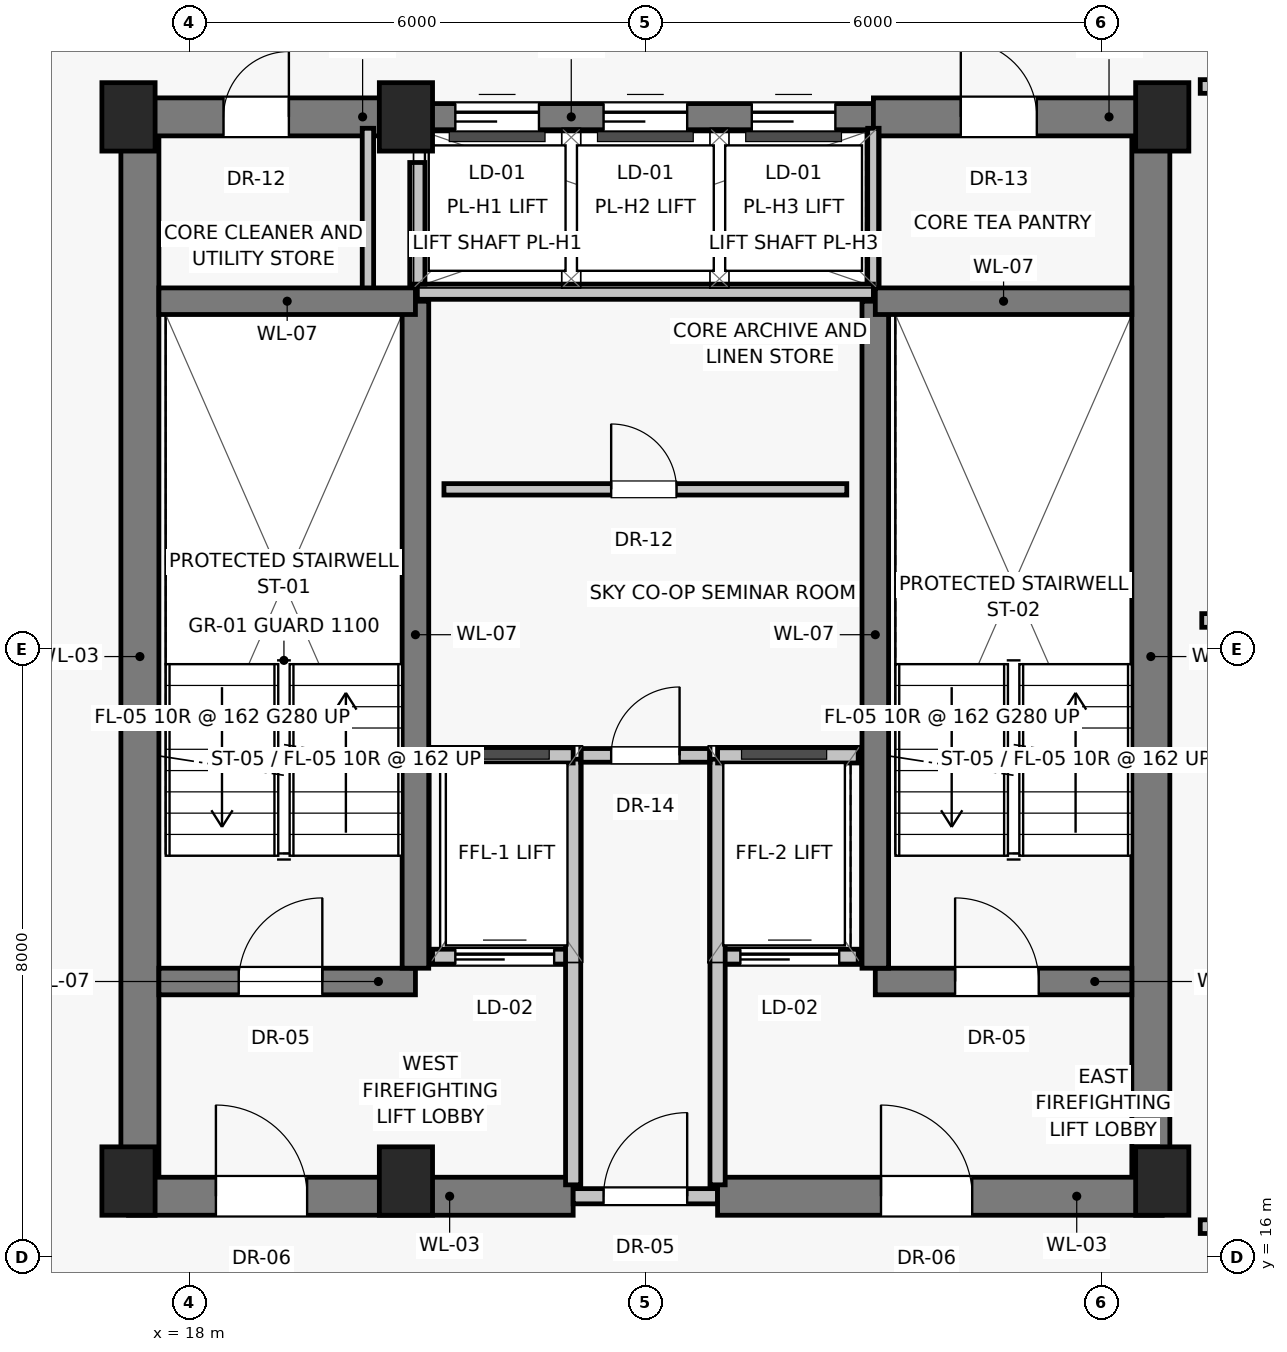
"""IFC4 building model, lengths in metres.
Left out: names, types, materials, properties, quantities, classifications, styles, units other than length and angle.
Written with IfcOpenShell. Run it as: python <this file> out.ifc"""

import sys

from ifc_helpers import new_model, si_unit, direction, frame, frame_2d, origin, origin_2d, place, context, subcontext, project, spatial, rectangle, extrude, source, transform, mapped, element, fill, save


model = new_model("IFC4")
c1 = context("Model", 3, precision=1e-05, world=origin(), true_north=direction((0.0, 1.0)))
c2 = subcontext(c1, "Body", "Model", "MODEL_VIEW")
j1 = project(units=[si_unit("LENGTHUNIT", "METRE"), si_unit("PLANEANGLEUNIT", "RADIAN")], contexts=[c1])
p1 = place(None, origin())
s1 = spatial("IfcSite", under=j1, at=p1, CompositionType="ELEMENT")
p2 = place(p1, origin())
s2 = spatial("IfcBuilding", under=s1, at=p2, CompositionType="ELEMENT")
p3 = place(p2, frame((0.0, 0.0, 261.0)))
s3 = spatial("IfcBuildingStorey", under=s2, at=p3, CompositionType="ELEMENT", Elevation=261.0)
for number, where, z_axis, x_axis in (
    (1, (17.2, 17.0, 0.0), (0.0, 0.0, 1.0), (1.0, 0.0, 0.0)),
    (2, (20.85, 17.0, 0.0), (0.0, 0.0, 1.0), (1.0, 0.0, 0.0)),
    (3, (30.8, 17.0, 0.0), (0.0, 0.0, 1.0), (1.0, 0.0, 0.0)),
    (4, (17.2, 31.0, 0.0), (0.0, 0.0, 1.0), (1.0, 0.0, 0.0)),
    (5, (20.85, 31.0, 0.0), (0.0, 0.0, 1.0), (1.0, 0.0, 0.0)),
    (6, (30.8, 31.0, 0.0), (0.0, 0.0, 1.0), (1.0, 0.0, 0.0)),
):
    element("IfcColumn", number, at=place(p3, frame(where, z_axis=z_axis, x_axis=x_axis)), inside=s3, PredefinedType="PILASTER", context=c2, shape_type="SweptSolid", body=[
        extrude(rectangle(XDim=0.7, YDim=0.9, at=origin_2d()), origin(), (0.0, 0.0, 1.0), 3.25),
    ])
for number, where, z_axis, x_axis in (
    (7, (17.35, 16.8, 0.0), (0.0, 0.0, 1.0), (0.0, 1.0, 0.0)),
    (8, (30.65, 16.8, 0.0), (0.0, 0.0, 1.0), (0.0, 1.0, 0.0)),
):
    element("IfcWall", number, at=place(p3, frame(where, z_axis=z_axis, x_axis=x_axis)), inside=s3, PredefinedType="SHEAR", context=c2, shape_type="SweptSolid", body=[
        extrude(rectangle(XDim=14.2, YDim=0.5, at=frame_2d((7.1, 0.0))), origin(), (0.0, 0.0, 1.0), 2.93),
    ])
p4 = place(p3, frame((17.2, 16.8, 0.0), z_axis=(0.0, 0.0, 1.0), x_axis=(1.0, 0.0, 0.0)))
e9 = element("IfcWall", 9, at=p4, inside=s3, PredefinedType="SHEAR", context=c2, shape_type="SweptSolid", body=[
    extrude(rectangle(XDim=5.85, YDim=0.5, at=frame_2d((2.925, 0.0))), origin(), (0.0, 0.0, 1.0), 2.93),
])
p5 = place(p4, frame((1.15, 0.0, 0.0)))
e10 = element("IfcOpeningElement", 10, at=p5, cuts=e9, PredefinedType="OPENING", context=c2, shape_type="SweptSolid", body=[
    extrude(rectangle(XDim=1.2, YDim=2.03, at=frame_2d((0.6, 1.015))), frame((0.0, 0.26, 0.0), z_axis=(0.0, -1.0, 0.0), x_axis=(1.0, 0.0, 0.0)), (0.0, 0.0, 1.0), 0.52),
])
p6 = place(p3, frame((23.05, 16.8, 0.0), z_axis=(0.0, 0.0, 1.0), x_axis=(1.0, 0.0, 0.0)))
e11 = element("IfcWall", 11, at=p6, inside=s3, PredefinedType="SOLIDWALL", context=c2, shape_type="SweptSolid", body=[
    extrude(rectangle(XDim=1.9, YDim=0.2, at=frame_2d((0.95, 0.0))), origin(), (0.0, 0.0, 1.0), 2.08),
])
p7 = place(p6, frame((0.4, 0.0, 0.0)))
e12 = element("IfcOpeningElement", 12, at=p7, cuts=e11, PredefinedType="OPENING", context=c2, shape_type="SweptSolid", body=[
    extrude(rectangle(XDim=1.1, YDim=2.03, at=frame_2d((0.55, 1.015))), frame((0.0, 0.11, 0.0), z_axis=(0.0, -1.0, 0.0), x_axis=(1.0, 0.0, 0.0)), (0.0, 0.0, 1.0), 0.22),
])
p8 = place(p3, frame((24.95, 16.8, 0.0), z_axis=(0.0, 0.0, 1.0), x_axis=(1.0, 0.0, 0.0)))
e13 = element("IfcWall", 13, at=p8, inside=s3, PredefinedType="SHEAR", context=c2, shape_type="SweptSolid", body=[
    extrude(rectangle(XDim=5.85, YDim=0.5, at=frame_2d((2.925, 0.0))), origin(), (0.0, 0.0, 1.0), 2.93),
])
p9 = place(p8, frame((2.15, 0.0, 0.0)))
e14 = element("IfcOpeningElement", 14, at=p9, cuts=e13, PredefinedType="OPENING", context=c2, shape_type="SweptSolid", body=[
    extrude(rectangle(XDim=1.2, YDim=2.03, at=frame_2d((0.6, 1.015))), frame((0.0, 0.26, 0.0), z_axis=(0.0, -1.0, 0.0), x_axis=(1.0, 0.0, 0.0)), (0.0, 0.0, 1.0), 0.52),
])
p10 = place(p3, frame((17.2, 31.0, 0.0), z_axis=(0.0, 0.0, 1.0), x_axis=(1.0, 0.0, 0.0)))
e15 = element("IfcWall", 15, at=p10, inside=s3, PredefinedType="SHEAR", context=c2, shape_type="SweptSolid", body=[
    extrude(rectangle(XDim=3.8, YDim=0.5, at=frame_2d((1.9, 0.0))), origin(), (0.0, 0.0, 1.0), 2.93),
])
p11 = place(p10, frame((1.25, 0.0, 0.0)))
e16 = element("IfcOpeningElement", 16, at=p11, cuts=e15, PredefinedType="OPENING", context=c2, shape_type="SweptSolid", body=[
    extrude(rectangle(XDim=0.86, YDim=2.01, at=frame_2d((0.43, 1.005))), frame((0.0, 0.26, 0.0), z_axis=(0.0, -1.0, 0.0), x_axis=(1.0, 0.0, 0.0)), (0.0, 0.0, 1.0), 0.52),
])
p12 = place(p3, frame((21.0, 31.0, 0.0), z_axis=(0.0, 0.0, 1.0), x_axis=(1.0, 0.0, 0.0)))
e17 = element("IfcWall", 17, at=p12, inside=s3, PredefinedType="SHEAR", context=c2, shape_type="SweptSolid", body=[
    extrude(rectangle(XDim=6.0, YDim=0.35, at=frame_2d((3.0, 0.0))), origin(), (0.0, 0.0, 1.0), 2.93),
])
p13 = place(p12, frame((0.5, 0.0, 0.0)))
e18 = element("IfcOpeningElement", 18, at=p13, cuts=e17, PredefinedType="OPENING", context=c2, shape_type="SweptSolid", body=[
    extrude(rectangle(XDim=1.1, YDim=2.08, at=frame_2d((0.55, 1.04))), frame((0.0, 0.185, 0.0), z_axis=(0.0, -1.0, 0.0), x_axis=(1.0, 0.0, 0.0)), (0.0, 0.0, 1.0), 0.37),
])
p14 = place(p12, frame((2.45, 0.0, 0.0)))
e19 = element("IfcOpeningElement", 19, at=p14, cuts=e17, PredefinedType="OPENING", context=c2, shape_type="SweptSolid", body=[
    extrude(rectangle(XDim=1.1, YDim=2.08, at=frame_2d((0.55, 1.04))), frame((0.0, 0.185, 0.0), z_axis=(0.0, -1.0, 0.0), x_axis=(1.0, 0.0, 0.0)), (0.0, 0.0, 1.0), 0.37),
])
p15 = place(p12, frame((4.4, 0.0, 0.0)))
e20 = element("IfcOpeningElement", 20, at=p15, cuts=e17, PredefinedType="OPENING", context=c2, shape_type="SweptSolid", body=[
    extrude(rectangle(XDim=1.1, YDim=2.08, at=frame_2d((0.55, 1.04))), frame((0.0, 0.185, 0.0), z_axis=(0.0, -1.0, 0.0), x_axis=(1.0, 0.0, 0.0)), (0.0, 0.0, 1.0), 0.37),
])
p16 = place(p3, frame((27.0, 31.0, 0.0), z_axis=(0.0, 0.0, 1.0), x_axis=(1.0, 0.0, 0.0)))
e21 = element("IfcWall", 21, at=p16, inside=s3, PredefinedType="SHEAR", context=c2, shape_type="SweptSolid", body=[
    extrude(rectangle(XDim=3.8, YDim=0.5, at=frame_2d((1.9, 0.0))), origin(), (0.0, 0.0, 1.0), 2.93),
])
p17 = place(p16, frame((1.15, 0.0, 0.0)))
e22 = element("IfcOpeningElement", 22, at=p17, cuts=e21, PredefinedType="OPENING", context=c2, shape_type="SweptSolid", body=[
    extrude(rectangle(XDim=1.0, YDim=2.01, at=frame_2d((0.5, 1.005))), frame((0.0, 0.26, 0.0), z_axis=(0.0, -1.0, 0.0), x_axis=(1.0, 0.0, 0.0)), (0.0, 0.0, 1.0), 0.52),
])
for number, where, z_axis, x_axis in (
    (23, (20.35, 28.65, 0.0), (0.0, 0.0, 1.0), (0.0, 1.0, 0.0)),
    (24, (27.0, 28.65, 0.0), (0.0, 0.0, 1.0), (0.0, 1.0, 0.0)),
):
    element("IfcWall", number, at=place(p3, frame(where, z_axis=z_axis, x_axis=x_axis)), inside=s3, PredefinedType="PARTITIONING", context=c2, shape_type="SweptSolid", body=[
        extrude(rectangle(XDim=2.2, YDim=0.15, at=frame_2d((1.1, 0.0))), origin(), (0.0, 0.0, 1.0), 2.93),
    ])
p18 = place(p3, frame((17.6, 19.625, 0.0), z_axis=(0.0, 0.0, 1.0), x_axis=(1.0, 0.0, 0.0)))
e25 = element("IfcWall", 25, at=p18, inside=s3, PredefinedType="SHEAR", context=c2, shape_type="SweptSolid", body=[
    extrude(rectangle(XDim=3.375, YDim=0.35, at=frame_2d((1.688, 0.0))), origin(), (0.0, 0.0, 1.0), 2.93),
])
p19 = place(p18, frame((1.05, 0.0, 0.0)))
e26 = element("IfcOpeningElement", 26, at=p19, cuts=e25, PredefinedType="OPENING", context=c2, shape_type="SweptSolid", body=[
    extrude(rectangle(XDim=1.1, YDim=2.03, at=frame_2d((0.55, 1.015))), frame((0.0, 0.185, 0.0), z_axis=(0.0, -1.0, 0.0), x_axis=(1.0, 0.0, 0.0)), (0.0, 0.0, 1.0), 0.37),
])
p20 = place(p3, frame((21.2, 19.95, 0.0), z_axis=(0.0, 0.0, 1.0), x_axis=(1.0, 0.0, 0.0)))
e27 = element("IfcWall", 27, at=p20, inside=s3, PredefinedType="SOLIDWALL", context=c2, shape_type="SweptSolid", body=[
    extrude(rectangle(XDim=1.85, YDim=0.2, at=frame_2d((0.925, 0.0))), origin(), (0.0, 0.0, 1.0), 2.93),
])
p21 = place(p20, frame((0.3, 0.0, 0.0)))
e28 = element("IfcOpeningElement", 28, at=p21, cuts=e27, PredefinedType="OPENING", context=c2, shape_type="SweptSolid", body=[
    extrude(rectangle(XDim=1.3, YDim=2.25, at=frame_2d((0.65, 1.125))), frame((0.0, 0.11, 0.0), z_axis=(0.0, -1.0, 0.0), x_axis=(1.0, 0.0, 0.0)), (0.0, 0.0, 1.0), 0.22),
])
p22 = place(p3, frame((24.95, 19.95, 0.0), z_axis=(0.0, 0.0, 1.0), x_axis=(1.0, 0.0, 0.0)))
e29 = element("IfcWall", 29, at=p22, inside=s3, PredefinedType="SOLIDWALL", context=c2, shape_type="SweptSolid", body=[
    extrude(rectangle(XDim=1.85, YDim=0.2, at=frame_2d((0.925, 0.0))), origin(), (0.0, 0.0, 1.0), 2.93),
])
p23 = place(p22, frame((0.3, 0.0, 0.0)))
e30 = element("IfcOpeningElement", 30, at=p23, cuts=e29, PredefinedType="OPENING", context=c2, shape_type="SweptSolid", body=[
    extrude(rectangle(XDim=1.3, YDim=2.25, at=frame_2d((0.65, 1.125))), frame((0.0, 0.11, 0.0), z_axis=(0.0, -1.0, 0.0), x_axis=(1.0, 0.0, 0.0)), (0.0, 0.0, 1.0), 0.22),
])
p24 = place(p3, frame((27.025, 19.625, 0.0), z_axis=(0.0, 0.0, 1.0), x_axis=(1.0, 0.0, 0.0)))
e31 = element("IfcWall", 31, at=p24, inside=s3, PredefinedType="SHEAR", context=c2, shape_type="SweptSolid", body=[
    extrude(rectangle(XDim=3.375, YDim=0.35, at=frame_2d((1.688, 0.0))), origin(), (0.0, 0.0, 1.0), 2.93),
])
p25 = place(p24, frame((1.05, 0.0, 0.0)))
e32 = element("IfcOpeningElement", 32, at=p25, cuts=e31, PredefinedType="OPENING", context=c2, shape_type="SweptSolid", body=[
    extrude(rectangle(XDim=1.1, YDim=2.03, at=frame_2d((0.55, 1.015))), frame((0.0, 0.185, 0.0), z_axis=(0.0, -1.0, 0.0), x_axis=(1.0, 0.0, 0.0)), (0.0, 0.0, 1.0), 0.37),
])
for number, where, z_axis, x_axis in (
    (33, (20.975, 19.8, 0.0), (0.0, 0.0, 1.0), (0.0, 1.0, 0.0)),
    (34, (27.025, 19.8, 0.0), (0.0, 0.0, 1.0), (0.0, 1.0, 0.0)),
):
    element("IfcWall", number, at=place(p3, frame(where, z_axis=z_axis, x_axis=x_axis)), inside=s3, PredefinedType="SHEAR", context=c2, shape_type="SweptSolid", body=[
        extrude(rectangle(XDim=8.775, YDim=0.35, at=frame_2d((4.387, 0.0))), origin(), (0.0, 0.0, 1.0), 2.93),
    ])
for number, where, z_axis, x_axis in (
    (35, (17.6, 28.575, 0.0), (0.0, 0.0, 1.0), (1.0, 0.0, 0.0)),
    (36, (27.025, 28.575, 0.0), (0.0, 0.0, 1.0), (1.0, 0.0, 0.0)),
):
    element("IfcWall", number, at=place(p3, frame(where, z_axis=z_axis, x_axis=x_axis)), inside=s3, PredefinedType="SHEAR", context=c2, shape_type="SweptSolid", body=[
        extrude(rectangle(XDim=3.375, YDim=0.35, at=frame_2d((1.688, 0.0))), origin(), (0.0, 0.0, 1.0), 2.93),
    ])
for number, where, z_axis, x_axis in (
    (37, (23.05, 16.95, 0.0), (0.0, 0.0, 1.0), (0.0, 1.0, 0.0)),
    (38, (24.95, 16.95, 0.0), (0.0, 0.0, 1.0), (0.0, 1.0, 0.0)),
):
    element("IfcWall", number, at=place(p3, frame(where, z_axis=z_axis, x_axis=x_axis)), inside=s3, PredefinedType="SOLIDWALL", context=c2, shape_type="SweptSolid", body=[
        extrude(rectangle(XDim=5.6, YDim=0.2, at=frame_2d((2.8, 0.0))), origin(), (0.0, 0.0, 1.0), 2.93),
    ])
for number, where, z_axis, x_axis in (
    (39, (21.2, 22.6, 0.0), (0.0, 0.0, 1.0), (1.0, 0.0, 0.0)),
    (40, (24.95, 22.6, 0.0), (0.0, 0.0, 1.0), (1.0, 0.0, 0.0)),
):
    element("IfcWall", number, at=place(p3, frame(where, z_axis=z_axis, x_axis=x_axis)), inside=s3, PredefinedType="SOLIDWALL", context=c2, shape_type="SweptSolid", body=[
        extrude(rectangle(XDim=1.85, YDim=0.2, at=frame_2d((0.925, 0.0))), origin(), (0.0, 0.0, 1.0), 2.93),
    ])
p26 = place(p3, frame((21.0, 28.7, 0.0), z_axis=(0.0, 0.0, 1.0), x_axis=(1.0, 0.0, 0.0)))
e41 = element("IfcWall", 41, at=p26, inside=s3, PredefinedType="SOLIDWALL", context=c2, shape_type="SweptSolid", body=[
    extrude(rectangle(XDim=6.0, YDim=0.2, at=frame_2d((3.0, 0.0))), origin(), (0.0, 0.0, 1.0), 2.93),
])
p27 = place(p3, frame((21.0, 28.8, 0.0), z_axis=(0.0, 0.0, 1.0), x_axis=(0.0, 1.0, 0.0)))
e42 = element("IfcWall", 42, at=p27, inside=s3, PredefinedType="SOLIDWALL", context=c2, shape_type="SweptSolid", body=[
    extrude(rectangle(XDim=1.6, YDim=0.2, at=frame_2d((0.8, 0.0))), origin(), (0.0, 0.0, 1.0), 2.93),
])
p28 = place(p3, frame((23.15, 22.6, 0.0), z_axis=(0.0, 0.0, 1.0), x_axis=(1.0, 0.0, 0.0)))
e43 = element("IfcWall", 43, at=p28, inside=s3, PredefinedType="PARTITIONING", context=c2, shape_type="SweptSolid", body=[
    extrude(rectangle(XDim=1.7, YDim=0.18, at=frame_2d((0.85, 0.0))), origin(), (0.0, 0.0, 1.0), 2.93),
])
p29 = place(p28, frame((0.4, 0.0, 0.0)))
e44 = element("IfcOpeningElement", 44, at=p29, cuts=e43, PredefinedType="OPENING", context=c2, shape_type="SweptSolid", body=[
    extrude(rectangle(XDim=0.9, YDim=2.01, at=frame_2d((0.45, 1.005))), frame((0.0, 0.1, 0.0), z_axis=(0.0, -1.0, 0.0), x_axis=(1.0, 0.0, 0.0)), (0.0, 0.0, 1.0), 0.2),
])
p30 = place(p3, frame((21.35, 26.1, 0.0), z_axis=(0.0, 0.0, 1.0), x_axis=(1.0, 0.0, 0.0)))
e45 = element("IfcWall", 45, at=p30, inside=s3, PredefinedType="PARTITIONING", context=c2, shape_type="SweptSolid", body=[
    extrude(rectangle(XDim=5.3, YDim=0.15, at=frame_2d((2.65, 0.0))), origin(), (0.0, 0.0, 1.0), 2.93),
])
p31 = place(p30, frame((2.2, 0.0, 0.0)))
e46 = element("IfcOpeningElement", 46, at=p31, cuts=e45, PredefinedType="OPENING", context=c2, shape_type="SweptSolid", body=[
    extrude(rectangle(XDim=0.86, YDim=2.01, at=frame_2d((0.43, 1.005))), frame((0.0, 0.085, 0.0), z_axis=(0.0, -1.0, 0.0), x_axis=(1.0, 0.0, 0.0)), (0.0, 0.0, 1.0), 0.17),
])
p32 = place(p3, frame((31.32, 24.375, 0.0), z_axis=(0.0, 0.0, 1.0), x_axis=(1.0, 0.0, 0.0)))
e47 = element("IfcWall", 47, at=p32, inside=s3, PredefinedType="PARTITIONING", context=c2, shape_type="SweptSolid", body=[
    extrude(rectangle(XDim=9.873, YDim=0.18, at=frame_2d((4.937, 0.0))), origin(), (0.0, 0.0, 1.0), 2.93),
])
p33 = place(p3, frame((31.3, 16.4, 0.0), z_axis=(0.0, 0.0, 1.0), x_axis=(1.0, 0.0, 0.0)))
e48 = element("IfcWall", 48, at=p33, inside=s3, PredefinedType="PARTITIONING", context=c2, shape_type="SweptSolid", body=[
    extrude(rectangle(XDim=1.92, YDim=0.18, at=frame_2d((0.96, 0.0))), origin(), (0.0, 0.0, 1.0), 2.93),
])
p34 = place(p33, frame((0.72, 0.0, 0.0)))
e49 = element("IfcOpeningElement", 49, at=p34, cuts=e48, PredefinedType="OPENING", context=c2, shape_type="SweptSolid", body=[
    extrude(rectangle(XDim=1.0, YDim=2.01, at=frame_2d((0.5, 1.005))), frame((0.0, 0.1, 0.0), z_axis=(0.0, -1.0, 0.0), x_axis=(1.0, 0.0, 0.0)), (0.0, 0.0, 1.0), 0.2),
])
p35 = place(p3, frame((31.3, 31.4, 0.0), z_axis=(0.0, 0.0, 1.0), x_axis=(1.0, 0.0, 0.0)))
e50 = element("IfcWall", 50, at=p35, inside=s3, PredefinedType="PARTITIONING", context=c2, shape_type="SweptSolid", body=[
    extrude(rectangle(XDim=1.92, YDim=0.18, at=frame_2d((0.96, 0.0))), origin(), (0.0, 0.0, 1.0), 2.93),
])
p36 = place(p35, frame((0.72, 0.0, 0.0)))
e51 = element("IfcOpeningElement", 51, at=p36, cuts=e50, PredefinedType="OPENING", context=c2, shape_type="SweptSolid", body=[
    extrude(rectangle(XDim=1.0, YDim=2.01, at=frame_2d((0.5, 1.005))), frame((0.0, 0.1, 0.0), z_axis=(0.0, -1.0, 0.0), x_axis=(1.0, 0.0, 0.0)), (0.0, 0.0, 1.0), 0.2),
])
m1 = source(origin(), c2, "Body", "SweptSolid", [
    extrude(rectangle(XDim=1.2, YDim=2.03, at=frame_2d((0.6, 1.015))), frame((0.0, 0.025, 0.0), z_axis=(0.0, -1.0, 0.0), x_axis=(1.0, 0.0, 0.0)), (0.0, 0.0, 1.0), 0.05),
])
p37 = place(p5, origin())
e52 = element("IfcDoor", 52, at=p37, inside=s3, OperationType="SINGLE_SWING_LEFT", PredefinedType="DOOR", context=c2, shape_type="MappedRepresentation", body=[
    mapped(m1, transform((0.0, 0.0, 0.0), scale=1.0)),
])
fill(e10, e52)
m2 = source(origin(), c2, "Body", "SweptSolid", [
    extrude(rectangle(XDim=1.1, YDim=2.03, at=frame_2d((0.55, 1.015))), frame((0.0, 0.025, 0.0), z_axis=(0.0, -1.0, 0.0), x_axis=(1.0, 0.0, 0.0)), (0.0, 0.0, 1.0), 0.05),
])
p38 = place(p7, origin())
e53 = element("IfcDoor", 53, at=p38, inside=s3, OperationType="SINGLE_SWING_RIGHT", PredefinedType="DOOR", context=c2, shape_type="MappedRepresentation", body=[
    mapped(m2, transform((0.0, 0.0, 0.0), scale=1.0)),
])
fill(e12, e53)
p39 = place(p9, origin())
e54 = element("IfcDoor", 54, at=p39, inside=s3, OperationType="SINGLE_SWING_LEFT", PredefinedType="DOOR", context=c2, shape_type="MappedRepresentation", body=[
    mapped(m1, transform((0.0, 0.0, 0.0), scale=1.0)),
])
fill(e14, e54)
m3 = source(origin(), c2, "Body", "SweptSolid", [
    extrude(rectangle(XDim=0.86, YDim=2.01, at=frame_2d((0.43, 1.005))), frame((0.0, 0.025, 0.0), z_axis=(0.0, -1.0, 0.0), x_axis=(1.0, 0.0, 0.0)), (0.0, 0.0, 1.0), 0.05),
])
p40 = place(p11, origin())
e55 = element("IfcDoor", 55, at=p40, inside=s3, OperationType="SINGLE_SWING_RIGHT", PredefinedType="DOOR", context=c2, shape_type="MappedRepresentation", body=[
    mapped(m3, transform((0.0, 0.0, 0.0), scale=1.0)),
])
fill(e16, e55)
m4 = source(origin(), c2, "Body", "SweptSolid", [
    extrude(rectangle(XDim=1.1, YDim=2.08, at=frame_2d((0.55, 1.04))), frame((0.0, 0.025, 0.0), z_axis=(0.0, -1.0, 0.0), x_axis=(1.0, 0.0, 0.0)), (0.0, 0.0, 1.0), 0.05),
])
p41 = place(p13, origin())
e56 = element("IfcDoor", 56, at=p41, inside=s3, OperationType="SLIDING_TO_LEFT", PredefinedType="DOOR", context=c2, shape_type="MappedRepresentation", body=[
    mapped(m4, transform((0.0, 0.0, 0.0), scale=1.0)),
])
fill(e18, e56)
p42 = place(p14, origin())
e57 = element("IfcDoor", 57, at=p42, inside=s3, OperationType="SLIDING_TO_LEFT", PredefinedType="DOOR", context=c2, shape_type="MappedRepresentation", body=[
    mapped(m4, transform((0.0, 0.0, 0.0), scale=1.0)),
])
fill(e19, e57)
p43 = place(p15, origin())
e58 = element("IfcDoor", 58, at=p43, inside=s3, OperationType="SLIDING_TO_LEFT", PredefinedType="DOOR", context=c2, shape_type="MappedRepresentation", body=[
    mapped(m4, transform((0.0, 0.0, 0.0), scale=1.0)),
])
fill(e20, e58)
m5 = source(origin(), c2, "Body", "SweptSolid", [
    extrude(rectangle(XDim=1.0, YDim=2.01, at=frame_2d((0.5, 1.005))), frame((0.0, 0.025, 0.0), z_axis=(0.0, -1.0, 0.0), x_axis=(1.0, 0.0, 0.0)), (0.0, 0.0, 1.0), 0.05),
])
p44 = place(p17, origin())
e59 = element("IfcDoor", 59, at=p44, inside=s3, OperationType="SINGLE_SWING_LEFT", PredefinedType="DOOR", context=c2, shape_type="MappedRepresentation", body=[
    mapped(m5, transform((0.0, 0.0, 0.0), scale=1.0)),
])
fill(e22, e59)
p45 = place(p19, origin())
e60 = element("IfcDoor", 60, at=p45, inside=s3, OperationType="SINGLE_SWING_RIGHT", PredefinedType="DOOR", context=c2, shape_type="MappedRepresentation", body=[
    mapped(m2, transform((0.0, 0.0, 0.0), scale=1.0)),
])
fill(e26, e60)
m6 = source(origin(), c2, "Body", "SweptSolid", [
    extrude(rectangle(XDim=1.3, YDim=2.25, at=frame_2d((0.65, 1.125))), frame((0.0, 0.025, 0.0), z_axis=(0.0, -1.0, 0.0), x_axis=(1.0, 0.0, 0.0)), (0.0, 0.0, 1.0), 0.05),
])
p46 = place(p21, origin())
e61 = element("IfcDoor", 61, at=p46, inside=s3, OperationType="SLIDING_TO_LEFT", PredefinedType="DOOR", context=c2, shape_type="MappedRepresentation", body=[
    mapped(m6, transform((0.0, 0.0, 0.0), scale=1.0)),
])
fill(e28, e61)
p47 = place(p23, origin())
e62 = element("IfcDoor", 62, at=p47, inside=s3, OperationType="SLIDING_TO_LEFT", PredefinedType="DOOR", context=c2, shape_type="MappedRepresentation", body=[
    mapped(m6, transform((0.0, 0.0, 0.0), scale=1.0)),
])
fill(e30, e62)
p48 = place(p25, origin())
e63 = element("IfcDoor", 63, at=p48, inside=s3, OperationType="SINGLE_SWING_LEFT", PredefinedType="DOOR", context=c2, shape_type="MappedRepresentation", body=[
    mapped(m2, transform((0.0, 0.0, 0.0), scale=1.0)),
])
fill(e32, e63)
m7 = source(origin(), c2, "Body", "SweptSolid", [
    extrude(rectangle(XDim=0.9, YDim=2.01, at=frame_2d((0.45, 1.005))), frame((0.0, 0.025, 0.0), z_axis=(0.0, -1.0, 0.0), x_axis=(1.0, 0.0, 0.0)), (0.0, 0.0, 1.0), 0.05),
])
p49 = place(p29, origin())
e64 = element("IfcDoor", 64, at=p49, inside=s3, OperationType="SINGLE_SWING_RIGHT", PredefinedType="DOOR", context=c2, shape_type="MappedRepresentation", body=[
    mapped(m7, transform((0.0, 0.0, 0.0), scale=1.0)),
])
fill(e44, e64)
p50 = place(p31, origin())
e65 = element("IfcDoor", 65, at=p50, inside=s3, OperationType="SINGLE_SWING_LEFT", PredefinedType="DOOR", context=c2, shape_type="MappedRepresentation", body=[
    mapped(m3, transform((0.0, 0.0, 0.0), scale=1.0)),
])
fill(e46, e65)
save(model, sys.argv[1])
